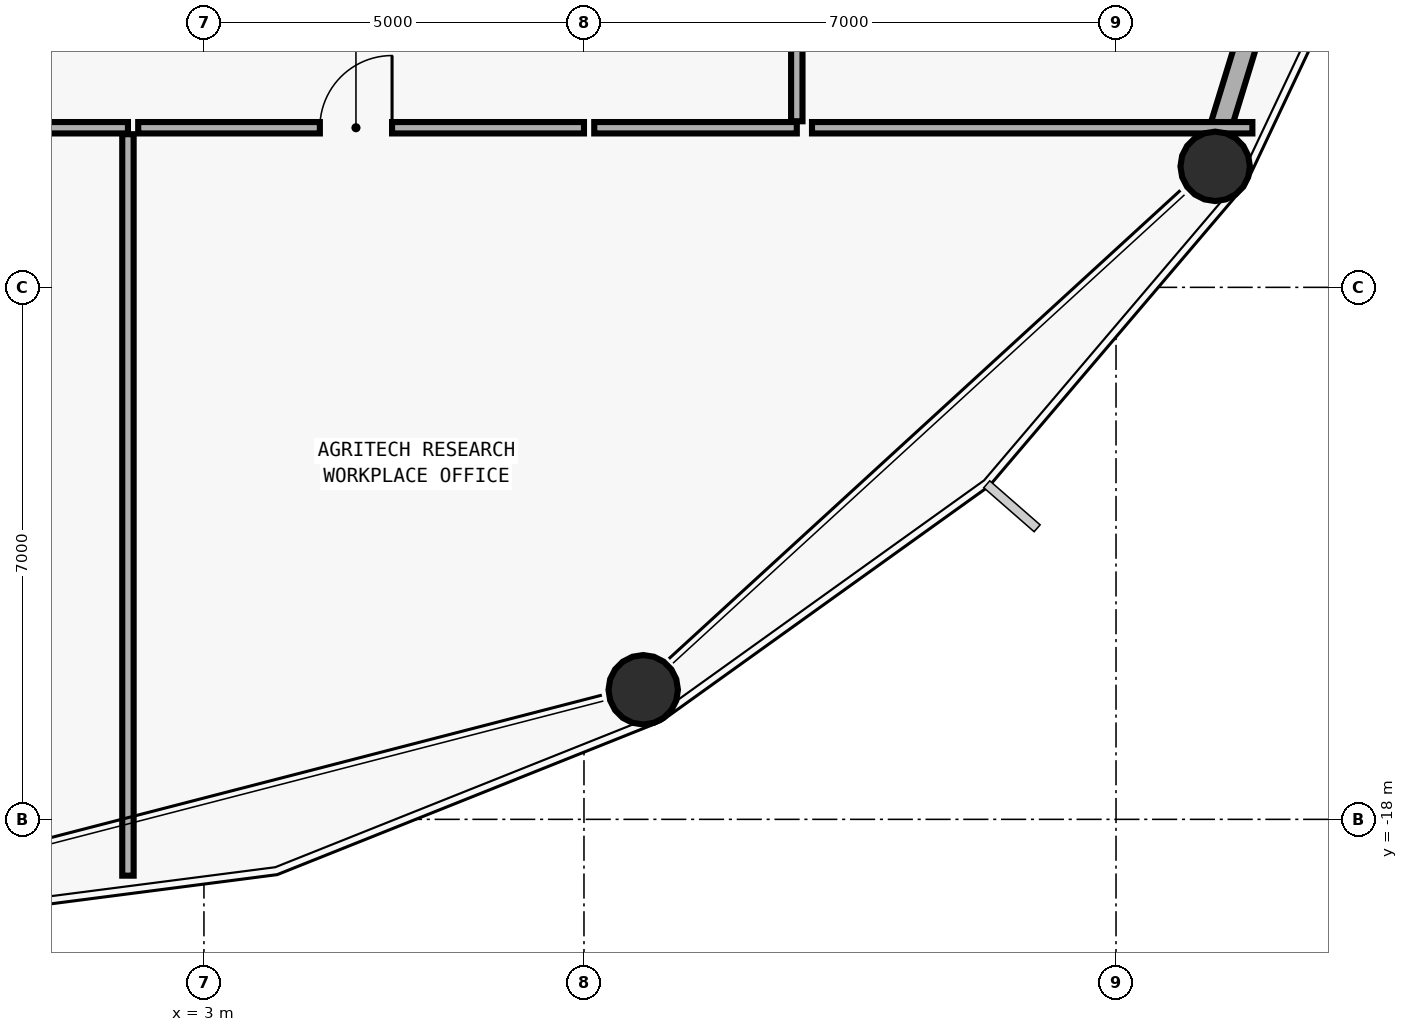
"""IFC4 building model, lengths in metres.
Left out: names, types, materials, properties, quantities, classifications, styles, units other than length and angle.
Written with IfcOpenShell. Run it as: python <this file> out.ifc"""

import sys

from ifc_helpers import new_model, si_unit, direction, frame, frame_2d, origin, origin_2d, place, context, subcontext, project, spatial, rectangle, hollow_circle, extrude, element, fill, save


model = new_model("IFC4")
c1 = context("Model", 3, precision=1e-05, world=origin(), true_north=direction((0.0, 1.0)))
c2 = subcontext(c1, "Body", "Model", "MODEL_VIEW")
j1 = project(units=[si_unit("LENGTHUNIT", "METRE"), si_unit("PLANEANGLEUNIT", "RADIAN")], contexts=[c1])
p1 = place(None, origin())
s1 = spatial("IfcSite", under=j1, at=p1, CompositionType="ELEMENT")
p2 = place(p1, origin())
s2 = spatial("IfcBuilding", under=s1, at=p2, CompositionType="ELEMENT")
p3 = place(p2, frame((0.0, 0.0, 39.3)))
s3 = spatial("IfcBuildingStorey", under=s2, at=p3, CompositionType="ELEMENT", Elevation=39.3)
p4 = place(p3, frame((8.736, -16.236, 0.0), z_axis=(0.022665133029, -0.030409053481, 0.999280531788), x_axis=(0.801789249334, 0.597606893913, 0.0)))
e1 = element("IfcColumn", 1, at=p4, inside=s3, PredefinedType="COLUMN", context=c2, shape_type="SweptSolid", body=[
    extrude(hollow_circle(Radius=0.457, WallThickness=0.032, at=origin_2d()), origin(), (0.0, 0.0, 1.0), 3.878),
])
p5 = place(p3, frame((16.229, -9.374, 0.0), z_axis=(0.039278153326, -0.017498920873, 0.999075079481), x_axis=(0.406953237239, 0.913448992939, 0.0)))
e2 = element("IfcColumn", 2, at=p5, inside=s3, PredefinedType="COLUMN", context=c2, shape_type="SweptSolid", body=[
    extrude(hollow_circle(Radius=0.457, WallThickness=0.032, at=origin_2d()), origin(), (0.0, 0.0, 1.0), 3.879),
])
p6 = place(p3, frame((18.985, -0.394, 0.0), z_axis=(0.0, 0.0, 1.0), x_axis=(-0.293459272164, -0.955971576764, 0.0)))
e3 = element("IfcWall", 3, at=p6, inside=s3, PredefinedType="SOLIDWALL", context=c2, shape_type="SweptSolid", body=[
    extrude(rectangle(XDim=8.982, YDim=0.28, at=frame_2d((4.491, 0.0))), origin(), (0.0, 0.0, 1.0), 3.06),
])
p7 = place(p3, frame((-2.0, -8.9, 0.0), z_axis=(0.0, 0.0, 1.0), x_axis=(1.0, 0.0, 0.0)))
e4 = element("IfcWall", 4, at=p7, inside=s3, PredefinedType="PARTITIONING", context=c2, shape_type="SweptSolid", body=[
    extrude(rectangle(XDim=4.0, YDim=0.15, at=frame_2d((2.0, 0.0))), origin(), (0.0, 0.0, 1.0), 3.64),
])
p8 = place(p7, frame((1.525, 0.0, 0.0)))
e5 = element("IfcOpeningElement", 5, at=p8, cuts=e4, PredefinedType="OPENING", context=c2, shape_type="SweptSolid", body=[
    extrude(rectangle(XDim=0.95, YDim=2.1, at=frame_2d((0.475, 1.05))), frame((0.0, 0.085, 0.0), z_axis=(0.0, -1.0, 0.0), x_axis=(1.0, 0.0, 0.0)), (0.0, 0.0, 1.0), 0.17),
])
p9 = place(p3, frame((2.135, -8.9, 0.0), z_axis=(0.0, 0.0, 1.0), x_axis=(1.0, 0.0, 0.0)))
e6 = element("IfcWall", 6, at=p9, inside=s3, PredefinedType="PARTITIONING", context=c2, shape_type="SweptSolid", body=[
    extrude(rectangle(XDim=5.865, YDim=0.15, at=frame_2d((2.933, 0.0))), origin(), (0.0, 0.0, 1.0), 3.64),
])
p10 = place(p9, frame((2.39, 0.0, 0.0)))
e7 = element("IfcOpeningElement", 7, at=p10, cuts=e6, PredefinedType="OPENING", context=c2, shape_type="SweptSolid", body=[
    extrude(rectangle(XDim=0.95, YDim=2.1, at=frame_2d((0.475, 1.05))), frame((0.0, 0.085, 0.0), z_axis=(0.0, -1.0, 0.0), x_axis=(1.0, 0.0, 0.0)), (0.0, 0.0, 1.0), 0.17),
])
p11 = place(p3, frame((2.0, -8.985, 0.0), z_axis=(0.0, 0.0, 1.0), x_axis=(0.0, -1.0, 0.0)))
e8 = element("IfcWall", 8, at=p11, inside=s3, PredefinedType="PARTITIONING", context=c2, shape_type="SweptSolid", body=[
    extrude(rectangle(XDim=9.756, YDim=0.15, at=frame_2d((4.878, 0.0))), origin(), (0.0, 0.0, 1.0), 3.64),
])
p12 = place(p3, frame((8.135, -8.9, 0.0), z_axis=(0.0, 0.0, 1.0), x_axis=(1.0, 0.0, 0.0)))
e9 = element("IfcWall", 9, at=p12, inside=s3, PredefinedType="PARTITIONING", context=c2, shape_type="SweptSolid", body=[
    extrude(rectangle(XDim=2.665, YDim=0.15, at=frame_2d((1.333, 0.0))), origin(), (0.0, 0.0, 1.0), 3.64),
])
p13 = place(p3, frame((11.0, -8.9, 0.0), z_axis=(0.0, 0.0, 1.0), x_axis=(1.0, 0.0, 0.0)))
e10 = element("IfcWall", 10, at=p13, inside=s3, PredefinedType="PARTITIONING", context=c2, shape_type="SweptSolid", body=[
    extrude(rectangle(XDim=5.794, YDim=0.15, at=frame_2d((2.897, 0.0))), origin(), (0.0, 0.0, 1.0), 2.972),
])
p14 = place(p3, frame((10.8, -8.815, 0.0), z_axis=(0.0, 0.0, 1.0), x_axis=(0.0, 1.0, 0.0)))
e11 = element("IfcWall", 11, at=p14, inside=s3, PredefinedType="PARTITIONING", context=c2, shape_type="SweptSolid", body=[
    extrude(rectangle(XDim=2.215, YDim=0.15, at=frame_2d((1.107, 0.0))), origin(), (0.0, 0.0, 1.0), 3.64),
])
p15 = place(p10, origin())
e12 = element("IfcDoor", 12, at=p15, inside=s3, OperationType="SINGLE_SWING_RIGHT", PredefinedType="DOOR", context=c2, shape_type="SweptSolid", body=[
    extrude(rectangle(XDim=0.95, YDim=2.1, at=frame_2d((0.475, 1.05))), frame((0.0, 0.025, 0.0), z_axis=(0.0, -1.0, 0.0), x_axis=(1.0, 0.0, 0.0)), (0.0, 0.0, 1.0), 0.05),
])
fill(e7, e12)
save(model, sys.argv[1])
